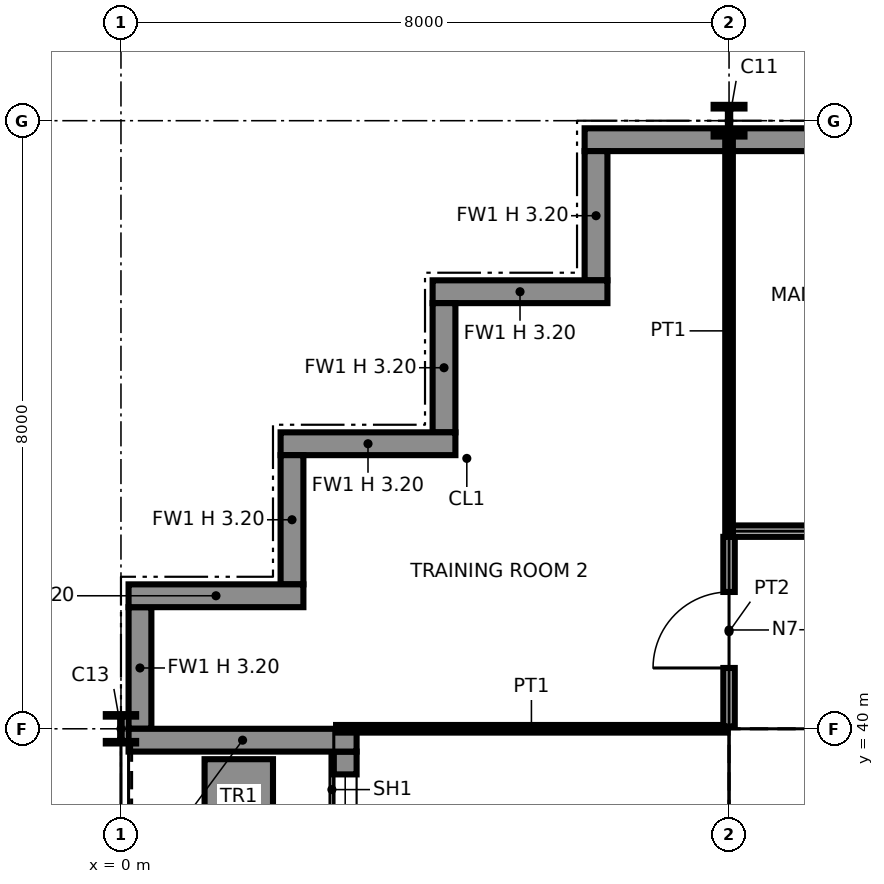
"""IFC4 building model, lengths in metres.
Left out: names, types, materials, properties, quantities, classifications, styles, units other than length and angle.
Written with IfcOpenShell. Run it as: python <this file> out.ifc"""

import sys

from ifc_helpers import new_model, si_unit, direction, frame, frame_2d, origin, origin_2d, place, context, subcontext, project, spatial, polyline, rectangle, i_section, outline, extrude, element, fill, save


model = new_model("IFC4")
c1 = context("Model", 3, precision=1e-05, world=origin(), true_north=direction((0.0, 1.0)))
c2 = subcontext(c1, "Body", "Model", "MODEL_VIEW")
j1 = project(units=[si_unit("LENGTHUNIT", "METRE"), si_unit("PLANEANGLEUNIT", "RADIAN")], contexts=[c1])
p1 = place(None, origin())
s1 = spatial("IfcSite", under=j1, at=p1, CompositionType="ELEMENT")
p2 = place(p1, origin())
s2 = spatial("IfcBuilding", under=s1, at=p2, CompositionType="ELEMENT")
p3 = place(p2, frame((0.0, 0.0, 109.6)))
s3 = spatial("IfcBuildingStorey", under=s2, at=p3, CompositionType="ELEMENT", Elevation=109.6)
p4 = place(p3, frame((0.0, 40.0, 0.0), z_axis=(0.0, 0.0, 1.0), x_axis=(1.0, 0.0, 0.0)))
e1 = element("IfcColumn", 1, at=p4, inside=s3, PredefinedType="COLUMN", context=c2, shape_type="SweptSolid", body=[
    extrude(i_section(OverallWidth=0.399, OverallDepth=0.386, WebThickness=0.021, FlangeThickness=0.033, at=origin_2d()), origin(), (0.0, 0.0, 1.0), 4.15),
])
p5 = place(p3, frame((8.0, 40.0, 0.0), z_axis=(0.0, 0.0, 1.0), x_axis=(1.0, 0.0, 0.0)))
e2 = element("IfcColumn", 2, at=p5, inside=s3, PredefinedType="COLUMN", context=c2, shape_type="SweptSolid", body=[
    extrude(i_section(OverallWidth=0.373, OverallDepth=0.368, WebThickness=0.015, FlangeThickness=0.024, at=origin_2d()), origin(), (0.0, 0.0, 1.0), 4.15),
])
p6 = place(p3, frame((8.0, 48.0, 0.0), z_axis=(0.0, 0.0, 1.0), x_axis=(1.0, 0.0, 0.0)))
e3 = element("IfcColumn", 3, at=p6, inside=s3, PredefinedType="COLUMN", context=c2, shape_type="SweptSolid", body=[
    extrude(i_section(OverallWidth=0.406, OverallDepth=0.417, WebThickness=0.03, FlangeThickness=0.048, at=origin_2d()), origin(), (0.0, 0.0, 1.0), 4.15),
])
p7 = place(p3, frame((0.25, 41.6, 0.0), z_axis=(0.0, 0.0, 1.0), x_axis=(0.0, -1.0, 0.0)))
e4 = element("IfcWall", 4, at=p7, inside=s3, PredefinedType="SOLIDWALL", context=c2, shape_type="SweptSolid", body=[
    extrude(rectangle(XDim=1.6, YDim=0.3, at=frame_2d((0.8, 0.0))), origin(), (0.0, 0.0, 1.0), 3.199),
])
p8 = place(p3, frame((2.95, 39.7, 0.0), z_axis=(0.0, 0.0, 1.0), x_axis=(0.0, -1.0, 0.0)))
e5 = element("IfcWall", 5, at=p8, inside=s3, PredefinedType="SOLIDWALL", context=c2, shape_type="SweptSolid", body=[
    extrude(rectangle(XDim=7.4, YDim=0.3, at=frame_2d((3.7, 0.0))), origin(), (0.0, 0.0, 1.0), 3.547),
])
p9 = place(p8, frame((0.3, 0.0, 0.9)))
e6 = element("IfcOpeningElement", 6, at=p9, cuts=e5, PredefinedType="OPENING", context=c2, shape_type="SweptSolid", body=[
    extrude(rectangle(XDim=2.8, YDim=2.2, at=frame_2d((1.4, 1.1))), frame((0.0, 0.16, 0.0), z_axis=(0.0, -1.0, 0.0), x_axis=(1.0, 0.0, 0.0)), (0.0, 0.0, 1.0), 0.32),
])
p10 = place(p8, frame((4.7, 0.0, 0.0)))
e7 = element("IfcOpeningElement", 7, at=p10, cuts=e5, PredefinedType="OPENING", context=c2, shape_type="SweptSolid", body=[
    extrude(rectangle(XDim=2.0, YDim=2.4, at=frame_2d((1.0, 1.2))), frame((0.0, 0.16, 0.0), z_axis=(0.0, -1.0, 0.0), x_axis=(1.0, 0.0, 0.0)), (0.0, 0.0, 1.0), 0.32),
])
p11 = place(p3, frame((0.1, 39.85, 0.0), z_axis=(0.0, 0.0, 1.0), x_axis=(1.0, 0.0, 0.0)))
e8 = element("IfcWall", 8, at=p11, inside=s3, PredefinedType="SOLIDWALL", context=c2, shape_type="SweptSolid", body=[
    extrude(rectangle(XDim=3.0, YDim=0.3, at=frame_2d((1.5, 0.0))), origin(), (0.0, 0.0, 1.0), 3.199),
])
p12 = place(p3, frame((1.55, 39.6, 0.0), z_axis=(0.0, 0.0, 1.0), x_axis=(0.0, -1.0, 0.0)))
e9 = element("IfcWall", 9, at=p12, inside=s3, PredefinedType="SOLIDWALL", context=c2, shape_type="SweptSolid", body=[
    extrude(rectangle(XDim=3.2, YDim=0.9, at=frame_2d((1.6, 0.0))), origin(), (0.0, 0.0, 1.0), 0.6),
])
p13 = place(p3, frame((16.0, 47.75, 0.0), z_axis=(0.0, 0.0, 1.0), x_axis=(-1.0, 0.0, 0.0)))
e10 = element("IfcWall", 10, at=p13, inside=s3, PredefinedType="SOLIDWALL", context=c2, shape_type="SweptSolid", body=[
    extrude(rectangle(XDim=9.9, YDim=0.3, at=frame_2d((4.95, 0.0))), origin(), (0.0, 0.0, 1.0), 3.199),
])
p14 = place(p3, frame((6.25, 47.6, 0.0), z_axis=(0.0, 0.0, 1.0), x_axis=(0.0, -1.0, 0.0)))
e11 = element("IfcWall", 11, at=p14, inside=s3, PredefinedType="SOLIDWALL", context=c2, shape_type="SweptSolid", body=[
    extrude(rectangle(XDim=1.7, YDim=0.3, at=frame_2d((0.85, 0.0))), origin(), (0.0, 0.0, 1.0), 3.199),
])
p15 = place(p3, frame((6.4, 45.75, 0.0), z_axis=(0.0, 0.0, 1.0), x_axis=(-1.0, 0.0, 0.0)))
e12 = element("IfcWall", 12, at=p15, inside=s3, PredefinedType="SOLIDWALL", context=c2, shape_type="SweptSolid", body=[
    extrude(rectangle(XDim=2.3, YDim=0.3, at=frame_2d((1.15, 0.0))), origin(), (0.0, 0.0, 1.0), 3.199),
])
p16 = place(p3, frame((4.25, 45.6, 0.0), z_axis=(0.0, 0.0, 1.0), x_axis=(0.0, -1.0, 0.0)))
e13 = element("IfcWall", 13, at=p16, inside=s3, PredefinedType="SOLIDWALL", context=c2, shape_type="SweptSolid", body=[
    extrude(rectangle(XDim=1.7, YDim=0.3, at=frame_2d((0.85, 0.0))), origin(), (0.0, 0.0, 1.0), 3.199),
])
p17 = place(p3, frame((4.4, 43.75, 0.0), z_axis=(0.0, 0.0, 1.0), x_axis=(-1.0, 0.0, 0.0)))
e14 = element("IfcWall", 14, at=p17, inside=s3, PredefinedType="SOLIDWALL", context=c2, shape_type="SweptSolid", body=[
    extrude(rectangle(XDim=2.3, YDim=0.3, at=frame_2d((1.15, 0.0))), origin(), (0.0, 0.0, 1.0), 3.199),
])
p18 = place(p3, frame((2.25, 43.6, 0.0), z_axis=(0.0, 0.0, 1.0), x_axis=(0.0, -1.0, 0.0)))
e15 = element("IfcWall", 15, at=p18, inside=s3, PredefinedType="SOLIDWALL", context=c2, shape_type="SweptSolid", body=[
    extrude(rectangle(XDim=1.7, YDim=0.3, at=frame_2d((0.85, 0.0))), origin(), (0.0, 0.0, 1.0), 3.199),
])
p19 = place(p3, frame((2.4, 41.75, 0.0), z_axis=(0.0, 0.0, 1.0), x_axis=(-1.0, 0.0, 0.0)))
e16 = element("IfcWall", 16, at=p19, inside=s3, PredefinedType="SOLIDWALL", context=c2, shape_type="SweptSolid", body=[
    extrude(rectangle(XDim=2.3, YDim=0.3, at=frame_2d((1.15, 0.0))), origin(), (0.0, 0.0, 1.0), 3.199),
])
p20 = place(p3, frame((8.75, 32.85, 0.0), z_axis=(0.0, 0.0, 1.0), x_axis=(0.0, 1.0, 0.0)))
e17 = element("IfcWall", 17, at=p20, inside=s3, PredefinedType="PARTITIONING", context=c2, shape_type="SweptSolid", body=[
    extrude(outline(polyline([(0.0, 0.0), (6.3, 0.0), (6.3, 4.15), (3.269, 4.15), (3.268, 3.542), (3.032, 3.542), (3.031, 4.15), (0.0, 4.15), (0.0, 0.0)])), frame((0.0, 0.1, 0.0), z_axis=(0.0, -1.0, 0.0), x_axis=(1.0, 0.0, 0.0)), (0.0, 0.0, 1.0), 0.2),
])
p21 = place(p3, frame((8.65, 39.25, 0.0), z_axis=(0.0, 0.0, 1.0), x_axis=(1.0, 0.0, 0.0)))
e18 = element("IfcWall", 18, at=p21, inside=s3, PredefinedType="PARTITIONING", context=c2, shape_type="SweptSolid", body=[
    extrude(outline(polyline([(0.0, 0.0), (14.7, 0.0), (14.7, 4.15), (7.489, 4.15), (7.488, 3.382), (7.212, 3.382), (7.211, 4.15), (0.0, 4.15), (0.0, 0.0)])), frame((0.0, 0.1, 0.0), z_axis=(0.0, -1.0, 0.0), x_axis=(1.0, 0.0, 0.0)), (0.0, 0.0, 1.0), 0.2),
])
p22 = place(p3, frame((2.83, 40.0, 0.0), z_axis=(0.0, 0.0, 1.0), x_axis=(1.0, 0.0, 0.0)))
e19 = element("IfcWall", 19, at=p22, inside=s3, PredefinedType="PARTITIONING", context=c2, shape_type="SweptSolid", body=[
    extrude(rectangle(XDim=5.14, YDim=0.1, at=frame_2d((2.57, 0.0))), origin(), (0.0, 0.0, 1.0), 3.194),
])
p23 = place(p3, frame((8.0, 40.03, 0.0), z_axis=(0.0, 0.0, 1.0), x_axis=(0.0, 1.0, 0.0)))
e20 = element("IfcWall", 20, at=p23, inside=s3, PredefinedType="PARTITIONING", context=c2, shape_type="SweptSolid", body=[
    extrude(rectangle(XDim=2.495, YDim=0.15, at=frame_2d((1.248, 0.0))), origin(), (0.0, 0.0, 1.0), 3.194),
])
p24 = place(p23, frame((0.77, 0.0, 0.0)))
e21 = element("IfcOpeningElement", 21, at=p24, cuts=e20, PredefinedType="OPENING", context=c2, shape_type="SweptSolid", body=[
    extrude(rectangle(XDim=1.0, YDim=2.1, at=frame_2d((0.5, 1.05))), frame((0.0, 0.085, 0.0), z_axis=(0.0, -1.0, 0.0), x_axis=(1.0, 0.0, 0.0)), (0.0, 0.0, 1.0), 0.17),
])
p25 = place(p3, frame((8.05, 42.6, 0.0), z_axis=(0.0, 0.0, 1.0), x_axis=(1.0, 0.0, 0.0)))
e22 = element("IfcWall", 22, at=p25, inside=s3, PredefinedType="PARTITIONING", context=c2, shape_type="SweptSolid", body=[
    extrude(rectangle(XDim=34.55, YDim=0.15, at=frame_2d((17.275, 0.0))), origin(), (0.0, 0.0, 1.0), 3.194),
])
p26 = place(p25, frame((9.45, 0.0, 0.0)))
e23 = element("IfcOpeningElement", 23, at=p26, cuts=e22, PredefinedType="OPENING", context=c2, shape_type="SweptSolid", body=[
    extrude(rectangle(XDim=1.0, YDim=2.1, at=frame_2d((0.5, 1.05))), frame((0.0, 0.085, 0.0), z_axis=(0.0, -1.0, 0.0), x_axis=(1.0, 0.0, 0.0)), (0.0, 0.0, 1.0), 0.17),
])
p27 = place(p25, frame((13.45, 0.0, 0.0)))
e24 = element("IfcOpeningElement", 24, at=p27, cuts=e22, PredefinedType="OPENING", context=c2, shape_type="SweptSolid", body=[
    extrude(rectangle(XDim=1.0, YDim=2.1, at=frame_2d((0.5, 1.05))), frame((0.0, 0.085, 0.0), z_axis=(0.0, -1.0, 0.0), x_axis=(1.0, 0.0, 0.0)), (0.0, 0.0, 1.0), 0.17),
])
p28 = place(p25, frame((25.45, 0.0, 0.0)))
e25 = element("IfcOpeningElement", 25, at=p28, cuts=e22, PredefinedType="OPENING", context=c2, shape_type="SweptSolid", body=[
    extrude(rectangle(XDim=1.0, YDim=2.1, at=frame_2d((0.5, 1.05))), frame((0.0, 0.085, 0.0), z_axis=(0.0, -1.0, 0.0), x_axis=(1.0, 0.0, 0.0)), (0.0, 0.0, 1.0), 0.17),
])
p29 = place(p25, frame((29.45, 0.0, 0.0)))
e26 = element("IfcOpeningElement", 26, at=p29, cuts=e22, PredefinedType="OPENING", context=c2, shape_type="SweptSolid", body=[
    extrude(rectangle(XDim=1.0, YDim=2.1, at=frame_2d((0.5, 1.05))), frame((0.0, 0.085, 0.0), z_axis=(0.0, -1.0, 0.0), x_axis=(1.0, 0.0, 0.0)), (0.0, 0.0, 1.0), 0.17),
])
p30 = place(p25, frame((1.45, 0.0, 0.0)))
e27 = element("IfcOpeningElement", 27, at=p30, cuts=e22, PredefinedType="OPENING", context=c2, shape_type="SweptSolid", body=[
    extrude(rectangle(XDim=1.0, YDim=2.1, at=frame_2d((0.5, 1.05))), frame((0.0, 0.085, 0.0), z_axis=(0.0, -1.0, 0.0), x_axis=(1.0, 0.0, 0.0)), (0.0, 0.0, 1.0), 0.17),
])
p31 = place(p25, frame((5.45, 0.0, 0.0)))
e28 = element("IfcOpeningElement", 28, at=p31, cuts=e22, PredefinedType="OPENING", context=c2, shape_type="SweptSolid", body=[
    extrude(rectangle(XDim=1.0, YDim=2.1, at=frame_2d((0.5, 1.05))), frame((0.0, 0.085, 0.0), z_axis=(0.0, -1.0, 0.0), x_axis=(1.0, 0.0, 0.0)), (0.0, 0.0, 1.0), 0.17),
])
p32 = place(p25, frame((17.45, 0.0, 0.0)))
e29 = element("IfcOpeningElement", 29, at=p32, cuts=e22, PredefinedType="OPENING", context=c2, shape_type="SweptSolid", body=[
    extrude(rectangle(XDim=1.0, YDim=2.1, at=frame_2d((0.5, 1.05))), frame((0.0, 0.085, 0.0), z_axis=(0.0, -1.0, 0.0), x_axis=(1.0, 0.0, 0.0)), (0.0, 0.0, 1.0), 0.17),
])
p33 = place(p25, frame((21.45, 0.0, 0.0)))
e30 = element("IfcOpeningElement", 30, at=p33, cuts=e22, PredefinedType="OPENING", context=c2, shape_type="SweptSolid", body=[
    extrude(rectangle(XDim=1.0, YDim=2.1, at=frame_2d((0.5, 1.05))), frame((0.0, 0.085, 0.0), z_axis=(0.0, -1.0, 0.0), x_axis=(1.0, 0.0, 0.0)), (0.0, 0.0, 1.0), 0.17),
])
p34 = place(p3, frame((8.0, 42.6, 0.0), z_axis=(0.0, 0.0, 1.0), x_axis=(0.0, 1.0, 0.0)))
e31 = element("IfcWall", 31, at=p34, inside=s3, PredefinedType="PARTITIONING", context=c2, shape_type="SweptSolid", body=[
    extrude(rectangle(XDim=5.27, YDim=0.1, at=frame_2d((2.635, 0.0))), origin(), (0.0, 0.0, 1.0), 3.194),
])
p35 = place(p9, origin())
e32 = element("IfcWindow", 32, at=p35, inside=s3, PartitioningType="SINGLE_PANEL", PredefinedType="WINDOW", context=c2, shape_type="SweptSolid", body=[
    extrude(rectangle(XDim=2.8, YDim=2.2, at=frame_2d((1.4, 1.1))), frame((0.0, 0.03, 0.0), z_axis=(0.0, -1.0, 0.0), x_axis=(1.0, 0.0, 0.0)), (0.0, 0.0, 1.0), 0.06),
])
fill(e6, e32)
p36 = place(p24, origin())
e33 = element("IfcDoor", 33, at=p36, inside=s3, OperationType="SINGLE_SWING_LEFT", PredefinedType="DOOR", context=c2, shape_type="SweptSolid", body=[
    extrude(rectangle(XDim=1.0, YDim=2.1, at=frame_2d((0.5, 1.05))), frame((0.0, 0.025, 0.0), z_axis=(0.0, -1.0, 0.0), x_axis=(1.0, 0.0, 0.0)), (0.0, 0.0, 1.0), 0.05),
])
fill(e21, e33)
save(model, sys.argv[1])
